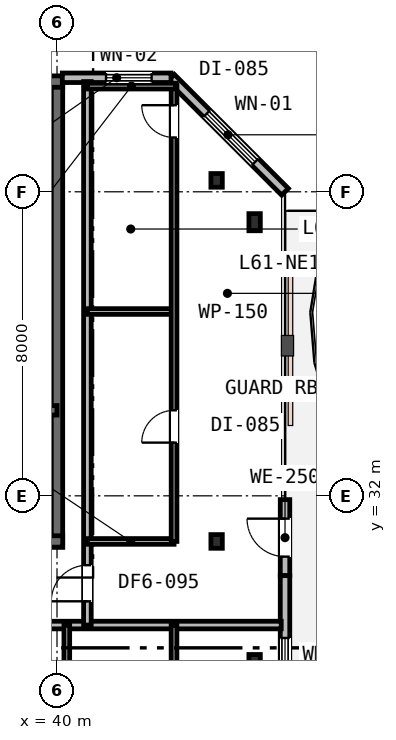
"""IFC4 building model, lengths in metres.
Left out: names, types, materials, properties, quantities, classifications, styles, units other than length and angle.
Written with IfcOpenShell. Run it as: python <this file> out.ifc"""

import sys

from ifc_helpers import new_model, si_unit, direction, frame, frame_2d, origin, origin_2d, place, context, subcontext, project, spatial, rectangle, i_section, extrude, element, fill, save


model = new_model("IFC4")
c1 = context("Model", 3, precision=1e-05, world=origin(), true_north=direction((0.0, 1.0)))
c2 = subcontext(c1, "Body", "Model", "MODEL_VIEW")
j1 = project(units=[si_unit("LENGTHUNIT", "METRE"), si_unit("PLANEANGLEUNIT", "RADIAN")], contexts=[c1])
p1 = place(None, origin())
s1 = spatial("IfcSite", under=j1, at=p1, CompositionType="ELEMENT")
p2 = place(p1, origin())
s2 = spatial("IfcBuilding", under=s1, at=p2, CompositionType="ELEMENT")
p3 = place(p2, frame((0.0, 0.0, 237.4)))
s3 = spatial("IfcBuildingStorey", under=s2, at=p3, CompositionType="ELEMENT", Elevation=237.4)
p4 = place(p3, frame((40.0, 30.65, 0.0), z_axis=(0.0, 0.0, 1.0), x_axis=(0.0, 1.0, 0.0)))
e1 = element("IfcWall", 1, at=p4, inside=s3, PredefinedType="SHEAR", context=c2, shape_type="SweptSolid", body=[
    extrude(rectangle(XDim=12.3, YDim=0.3, at=frame_2d((6.15, 0.0))), origin(), (0.0, 0.0, 1.0), 3.8),
])
p5 = place(p3, frame((15.85, 42.9, 0.0), z_axis=(0.0, 0.0, 1.0), x_axis=(1.0, 0.0, 0.0)))
e2 = element("IfcWall", 2, at=p5, inside=s3, PredefinedType="SHEAR", context=c2, shape_type="SweptSolid", body=[
    extrude(rectangle(XDim=24.3, YDim=0.3, at=frame_2d((12.15, 0.0))), origin(), (0.0, 0.0, 1.0), 3.8),
])
p6 = place(p5, frame((1.6, 0.0, 0.95)))
e3 = element("IfcOpeningElement", 3, at=p6, cuts=e2, PredefinedType="OPENING", context=c2, shape_type="SweptSolid", body=[
    extrude(rectangle(XDim=1.2, YDim=1.6, at=frame_2d((0.6, 0.8))), frame((0.0, 0.16, 0.0), z_axis=(0.0, -1.0, 0.0), x_axis=(1.0, 0.0, 0.0)), (0.0, 0.0, 1.0), 0.32),
])
p7 = place(p5, frame((16.5, 0.0, 0.95)))
e4 = element("IfcOpeningElement", 4, at=p7, cuts=e2, PredefinedType="OPENING", context=c2, shape_type="SweptSolid", body=[
    extrude(rectangle(XDim=1.2, YDim=1.6, at=frame_2d((0.6, 0.8))), frame((0.0, 0.16, 0.0), z_axis=(0.0, -1.0, 0.0), x_axis=(1.0, 0.0, 0.0)), (0.0, 0.0, 1.0), 0.32),
])
p8 = place(p5, frame((21.6, 0.0, 0.95)))
e5 = element("IfcOpeningElement", 5, at=p8, cuts=e2, PredefinedType="OPENING", context=c2, shape_type="SweptSolid", body=[
    extrude(rectangle(XDim=1.2, YDim=1.6, at=frame_2d((0.6, 0.8))), frame((0.0, 0.16, 0.0), z_axis=(0.0, -1.0, 0.0), x_axis=(1.0, 0.0, 0.0)), (0.0, 0.0, 1.0), 0.32),
])
p9 = place(p3, frame((28.95, 30.8, 0.0), z_axis=(0.0, 0.0, 1.0), x_axis=(1.0, 0.0, 0.0)))
e6 = element("IfcWall", 6, at=p9, inside=s3, PredefinedType="SHEAR", context=c2, shape_type="SweptSolid", body=[
    extrude(rectangle(XDim=11.2, YDim=0.3, at=frame_2d((5.6, 0.0))), origin(), (0.0, 0.0, 1.0), 3.8),
])
p10 = place(p9, frame((7.65, 0.0, 0.0)))
e7 = element("IfcOpeningElement", 7, at=p10, cuts=e6, PredefinedType="OPENING", context=c2, shape_type="SweptSolid", body=[
    extrude(rectangle(XDim=1.1, YDim=2.15, at=frame_2d((0.55, 1.075))), frame((0.0, 0.16, 0.0), z_axis=(0.0, -1.0, 0.0), x_axis=(1.0, 0.0, 0.0)), (0.0, 0.0, 1.0), 0.32),
])
p11 = place(p3, frame((33.95, 34.25, 0.0), z_axis=(0.0, 0.0, 1.0), x_axis=(1.0, 0.0, 0.0)))
e8 = element("IfcWall", 8, at=p11, inside=s3, PredefinedType="SHEAR", context=c2, shape_type="SweptSolid", body=[
    extrude(rectangle(XDim=6.05, YDim=0.25, at=frame_2d((3.025, 0.0))), origin(), (0.0, 0.0, 1.0), 3.8),
])
p12 = place(p11, frame((3.7, 0.0, 0.0)))
e9 = element("IfcOpeningElement", 9, at=p12, cuts=e8, PredefinedType="OPENING", context=c2, shape_type="SweptSolid", body=[
    extrude(rectangle(XDim=1.0, YDim=2.15, at=frame_2d((0.5, 1.075))), frame((0.0, 0.135, 0.0), z_axis=(0.0, -1.0, 0.0), x_axis=(1.0, 0.0, 0.0)), (0.0, 0.0, 1.0), 0.27),
])
p13 = place(p11, frame((0.55, 0.0, 0.0)))
e10 = element("IfcOpeningElement", 10, at=p13, cuts=e8, PredefinedType="OPENING", context=c2, shape_type="SweptSolid", body=[
    extrude(rectangle(XDim=1.1, YDim=2.15, at=frame_2d((0.55, 1.075))), frame((0.0, 0.135, 0.0), z_axis=(0.0, -1.0, 0.0), x_axis=(1.0, 0.0, 0.0)), (0.0, 0.0, 1.0), 0.27),
])
for number, where, z_axis, x_axis in (
    (11, (45.2, 27.6, 0.0), (0.0, 0.0, 1.0), (1.0, 0.0, 0.0)),
    (12, (45.2, 39.2, 0.0), (0.0, 0.0, 1.0), (1.0, 0.0, 0.0)),
):
    element("IfcColumn", number, at=place(p3, frame(where, z_axis=z_axis, x_axis=x_axis)), inside=s3, PredefinedType="COLUMN", context=c2, shape_type="SweptSolid", body=[
        extrude(i_section(OverallWidth=0.3, OverallDepth=0.45, WebThickness=0.014, FlangeThickness=0.026, FilletRadius=0.027, at=origin_2d()), origin(), (0.0, 0.0, 1.0), 3.8),
    ])
for number, where, z_axis, x_axis in (
    (13, (44.2, 30.8, 0.0), (0.0, 0.0, 1.0), (1.0, 0.0, 0.0)),
    (14, (44.2, 40.3, 0.0), (0.0, 0.0, 1.0), (1.0, 0.0, 0.0)),
):
    element("IfcColumn", number, at=place(p3, frame(where, z_axis=z_axis, x_axis=x_axis)), inside=s3, PredefinedType="COLUMN", context=c2, shape_type="SweptSolid", body=[
        extrude(i_section(OverallWidth=0.3, OverallDepth=0.36, WebThickness=0.013, FlangeThickness=0.022, FilletRadius=0.027, at=origin_2d()), origin(), (0.0, 0.0, 1.0), 3.8),
    ])
p14 = place(p3, frame((46.0, 29.9, 0.0), z_axis=(0.0, 0.0, 1.0), x_axis=(0.0, 1.0, 0.0)))
e15 = element("IfcWall", 15, at=p14, inside=s3, PredefinedType="STANDARD", context=c2, shape_type="SweptSolid", body=[
    extrude(rectangle(XDim=2.0, YDim=0.25, at=frame_2d((1.0, 0.0))), origin(), (0.0, 0.0, 1.0), 3.53),
])
p15 = place(p14, frame((0.5, 0.0, 0.0)))
e16 = element("IfcOpeningElement", 16, at=p15, cuts=e15, PredefinedType="OPENING", context=c2, shape_type="SweptSolid", body=[
    extrude(rectangle(XDim=1.0, YDim=2.15, at=frame_2d((0.5, 1.075))), frame((0.0, 0.135, 0.0), z_axis=(0.0, -1.0, 0.0), x_axis=(1.0, 0.0, 0.0)), (0.0, 0.0, 1.0), 0.27),
])
p16 = place(p3, frame((46.0, 27.0, 0.0), z_axis=(0.0, 0.0, 1.0), x_axis=(0.0, 1.0, 0.0)))
e17 = element("IfcWall", 17, at=p16, inside=s3, PredefinedType="STANDARD", context=c2, shape_type="SweptSolid", body=[
    extrude(rectangle(XDim=2.9, YDim=0.25, at=frame_2d((1.45, 0.0))), origin(), (0.0, 0.0, 1.0), 3.53),
])
p17 = place(p16, frame((0.36, 0.0, 0.9)))
e18 = element("IfcOpeningElement", 18, at=p17, cuts=e17, PredefinedType="OPENING", context=c2, shape_type="SweptSolid", body=[
    extrude(rectangle(XDim=0.9, YDim=1.55, at=frame_2d((0.45, 0.775))), frame((0.0, 0.135, 0.0), z_axis=(0.0, -1.0, 0.0), x_axis=(1.0, 0.0, 0.0)), (0.0, 0.0, 1.0), 0.27),
])
p18 = place(p3, frame((46.0, 40.0, 0.0), z_axis=(0.0, 0.0, 1.0), x_axis=(-0.707106781187, 0.707106781187, 0.0)))
e19 = element("IfcWall", 19, at=p18, inside=s3, PredefinedType="STANDARD", context=c2, shape_type="SweptSolid", body=[
    extrude(rectangle(XDim=4.243, YDim=0.25, at=frame_2d((2.121, 0.0))), origin(), (0.0, 0.0, 1.0), 3.53),
])
p19 = place(p18, frame((1.111, 0.0, 0.75)))
e20 = element("IfcOpeningElement", 20, at=p19, cuts=e19, PredefinedType="OPENING", context=c2, shape_type="SweptSolid", body=[
    extrude(rectangle(XDim=1.8, YDim=1.85, at=frame_2d((0.9, 0.925))), frame((0.0, 0.135, 0.0), z_axis=(0.0, -1.0, 0.0), x_axis=(1.0, 0.0, 0.0)), (0.0, 0.0, 1.0), 0.27),
])
p20 = place(p3, frame((43.0, 43.0, 0.0), z_axis=(0.0, 0.0, 1.0), x_axis=(-1.0, 0.0, 0.0)))
e21 = element("IfcWall", 21, at=p20, inside=s3, PredefinedType="STANDARD", context=c2, shape_type="SweptSolid", body=[
    extrude(rectangle(XDim=2.86, YDim=0.25, at=frame_2d((1.43, 0.0))), origin(), (0.0, 0.0, 1.0), 3.53),
])
p21 = place(p20, frame((0.51, 0.0, 0.85)))
e22 = element("IfcOpeningElement", 22, at=p21, cuts=e21, PredefinedType="OPENING", context=c2, shape_type="SweptSolid", body=[
    extrude(rectangle(XDim=1.2, YDim=1.6, at=frame_2d((0.6, 0.8))), frame((0.0, 0.135, 0.0), z_axis=(0.0, -1.0, 0.0), x_axis=(1.0, 0.0, 0.0)), (0.0, 0.0, 1.0), 0.27),
])
p22 = place(p3, frame((20.2, 28.6, 0.0), z_axis=(0.0, 0.0, 1.0), x_axis=(1.0, 0.0, 0.0)))
e23 = element("IfcWall", 23, at=p22, inside=s3, PredefinedType="PARTITIONING", context=c2, shape_type="SweptSolid", body=[
    extrude(rectangle(XDim=25.7, YDim=0.2, at=frame_2d((12.85, 0.0))), origin(), (0.0, 0.0, 1.0), 2.92),
])
p23 = place(p22, frame((4.475, 0.0, 0.0)))
e24 = element("IfcOpeningElement", 24, at=p23, cuts=e23, PredefinedType="OPENING", context=c2, shape_type="SweptSolid", body=[
    extrude(rectangle(XDim=0.95, YDim=2.15, at=frame_2d((0.475, 1.075))), frame((0.0, 0.11, 0.0), z_axis=(0.0, -1.0, 0.0), x_axis=(1.0, 0.0, 0.0)), (0.0, 0.0, 1.0), 0.22),
])
p24 = place(p22, frame((10.875, 0.0, 0.0)))
e25 = element("IfcOpeningElement", 25, at=p24, cuts=e23, PredefinedType="OPENING", context=c2, shape_type="SweptSolid", body=[
    extrude(rectangle(XDim=0.95, YDim=2.15, at=frame_2d((0.475, 1.075))), frame((0.0, 0.11, 0.0), z_axis=(0.0, -1.0, 0.0), x_axis=(1.0, 0.0, 0.0)), (0.0, 0.0, 1.0), 0.22),
])
p25 = place(p22, frame((17.854, 0.0, 0.0)))
e26 = element("IfcOpeningElement", 26, at=p25, cuts=e23, PredefinedType="OPENING", context=c2, shape_type="SweptSolid", body=[
    extrude(rectangle(XDim=0.95, YDim=2.15, at=frame_2d((0.475, 1.075))), frame((0.0, 0.11, 0.0), z_axis=(0.0, -1.0, 0.0), x_axis=(1.0, 0.0, 0.0)), (0.0, 0.0, 1.0), 0.22),
])
p26 = place(p3, frame((40.8, 28.6, 0.0), z_axis=(0.0, 0.0, 1.0), x_axis=(0.0, 1.0, 0.0)))
e27 = element("IfcWall", 27, at=p26, inside=s3, PredefinedType="PARTITIONING", context=c2, shape_type="SweptSolid", body=[
    extrude(rectangle(XDim=14.3, YDim=0.2, at=frame_2d((7.15, 0.0))), origin(), (0.0, 0.0, 1.0), 2.92),
])
p27 = place(p26, frame((0.625, 0.0, 0.0)))
e28 = element("IfcOpeningElement", 28, at=p27, cuts=e27, PredefinedType="OPENING", context=c2, shape_type="SweptSolid", body=[
    extrude(rectangle(XDim=0.95, YDim=2.15, at=frame_2d((0.475, 1.075))), frame((0.0, 0.11, 0.0), z_axis=(0.0, -1.0, 0.0), x_axis=(1.0, 0.0, 0.0)), (0.0, 0.0, 1.0), 0.22),
])
p28 = place(p3, frame((40.8, 30.8, 0.0), z_axis=(0.0, 0.0, 1.0), x_axis=(1.0, 0.0, 0.0)))
e29 = element("IfcWall", 29, at=p28, inside=s3, PredefinedType="PARTITIONING", context=c2, shape_type="SweptSolid", body=[
    extrude(rectangle(XDim=2.28, YDim=0.15, at=frame_2d((1.14, 0.0))), origin(), (0.0, 0.0, 1.0), 2.92),
])
p29 = place(p3, frame((40.8, 36.85, 0.0), z_axis=(0.0, 0.0, 1.0), x_axis=(1.0, 0.0, 0.0)))
e30 = element("IfcWall", 30, at=p29, inside=s3, PredefinedType="PARTITIONING", context=c2, shape_type="SweptSolid", body=[
    extrude(rectangle(XDim=2.28, YDim=0.15, at=frame_2d((1.14, 0.0))), origin(), (0.0, 0.0, 1.0), 3.53),
])
p30 = place(p3, frame((43.08, 30.8, 0.0), z_axis=(0.0, 0.0, 1.0), x_axis=(0.0, 1.0, 0.0)))
e31 = element("IfcWall", 31, at=p30, inside=s3, PredefinedType="PARTITIONING", context=c2, shape_type="SweptSolid", body=[
    extrude(rectangle(XDim=12.02, YDim=0.15, at=frame_2d((6.01, 0.0))), origin(), (0.0, 0.0, 1.0), 2.92),
])
p31 = place(p30, frame((2.6, 0.0, 0.0)))
e32 = element("IfcOpeningElement", 32, at=p31, cuts=e31, PredefinedType="OPENING", context=c2, shape_type="SweptSolid", body=[
    extrude(rectangle(XDim=0.85, YDim=2.15, at=frame_2d((0.425, 1.075))), frame((0.0, 0.085, 0.0), z_axis=(0.0, -1.0, 0.0), x_axis=(1.0, 0.0, 0.0)), (0.0, 0.0, 1.0), 0.17),
])
p32 = place(p30, frame((10.629, 0.0, 0.0)))
e33 = element("IfcOpeningElement", 33, at=p32, cuts=e31, PredefinedType="OPENING", context=c2, shape_type="SweptSolid", body=[
    extrude(rectangle(XDim=0.85, YDim=2.15, at=frame_2d((0.425, 1.075))), frame((0.0, 0.085, 0.0), z_axis=(0.0, -1.0, 0.0), x_axis=(1.0, 0.0, 0.0)), (0.0, 0.0, 1.0), 0.17),
])
p33 = place(p3, frame((40.8, 42.78, 0.0), z_axis=(0.0, 0.0, 1.0), x_axis=(1.0, 0.0, 0.0)))
e34 = element("IfcWall", 34, at=p33, inside=s3, PredefinedType="PARTITIONING", context=c2, shape_type="SweptSolid", body=[
    extrude(rectangle(XDim=2.32, YDim=0.15, at=frame_2d((1.16, 0.0))), origin(), (0.0, 0.0, 1.0), 3.53),
])
for number, where, z_axis, x_axis in (
    (35, (40.258, 26.576, 0.0), (0.0, 0.0, 1.0), (0.0, 1.0, 0.0)),
    (36, (43.079, 26.576, 0.0), (0.0, 0.0, 1.0), (0.0, 1.0, 0.0)),
):
    element("IfcWall", number, at=place(p3, frame(where, z_axis=z_axis, x_axis=x_axis)), inside=s3, PredefinedType="PARTITIONING", context=c2, shape_type="SweptSolid", body=[
        extrude(rectangle(XDim=2.024, YDim=0.15, at=frame_2d((1.012, 0.0))), origin(), (0.0, 0.0, 1.0), 3.53),
    ])
p34 = place(p15, origin())
e37 = element("IfcDoor", 37, at=p34, inside=s3, OperationType="SINGLE_SWING_RIGHT", PredefinedType="DOOR", context=c2, shape_type="SweptSolid", body=[
    extrude(rectangle(XDim=1.0, YDim=2.15, at=frame_2d((0.5, 1.075))), frame((0.0, 0.025, 0.0), z_axis=(0.0, -1.0, 0.0), x_axis=(1.0, 0.0, 0.0)), (0.0, 0.0, 1.0), 0.05),
])
fill(e16, e37)
p35 = place(p17, origin())
e38 = element("IfcWindow", 38, at=p35, inside=s3, PartitioningType="SINGLE_PANEL", PredefinedType="WINDOW", context=c2, shape_type="SweptSolid", body=[
    extrude(rectangle(XDim=0.9, YDim=1.55, at=frame_2d((0.45, 0.775))), frame((0.0, 0.03, 0.0), z_axis=(0.0, -1.0, 0.0), x_axis=(1.0, 0.0, 0.0)), (0.0, 0.0, 1.0), 0.06),
])
fill(e18, e38)
p36 = place(p19, origin())
e39 = element("IfcWindow", 39, at=p36, inside=s3, PartitioningType="SINGLE_PANEL", PredefinedType="WINDOW", context=c2, shape_type="SweptSolid", body=[
    extrude(rectangle(XDim=1.8, YDim=1.85, at=frame_2d((0.9, 0.925))), frame((0.0, 0.03, 0.0), z_axis=(0.0, -1.0, 0.0), x_axis=(1.0, 0.0, 0.0)), (0.0, 0.0, 1.0), 0.06),
])
fill(e20, e39)
p37 = place(p21, origin())
e40 = element("IfcWindow", 40, at=p37, inside=s3, PartitioningType="SINGLE_PANEL", PredefinedType="WINDOW", context=c2, shape_type="SweptSolid", body=[
    extrude(rectangle(XDim=1.2, YDim=1.6, at=frame_2d((0.6, 0.8))), frame((0.0, 0.03, 0.0), z_axis=(0.0, -1.0, 0.0), x_axis=(1.0, 0.0, 0.0)), (0.0, 0.0, 1.0), 0.06),
])
fill(e22, e40)
p38 = place(p27, origin())
e41 = element("IfcDoor", 41, at=p38, inside=s3, OperationType="SINGLE_SWING_LEFT", PredefinedType="DOOR", context=c2, shape_type="SweptSolid", body=[
    extrude(rectangle(XDim=0.95, YDim=2.15, at=frame_2d((0.475, 1.075))), frame((0.0, 0.025, 0.0), z_axis=(0.0, -1.0, 0.0), x_axis=(1.0, 0.0, 0.0)), (0.0, 0.0, 1.0), 0.05),
])
fill(e28, e41)
p39 = place(p31, origin())
e42 = element("IfcDoor", 42, at=p39, inside=s3, OperationType="SINGLE_SWING_LEFT", PredefinedType="DOOR", context=c2, shape_type="SweptSolid", body=[
    extrude(rectangle(XDim=0.85, YDim=2.15, at=frame_2d((0.425, 1.075))), frame((0.0, 0.025, 0.0), z_axis=(0.0, -1.0, 0.0), x_axis=(1.0, 0.0, 0.0)), (0.0, 0.0, 1.0), 0.05),
])
fill(e32, e42)
p40 = place(p32, origin())
e43 = element("IfcDoor", 43, at=p40, inside=s3, OperationType="SINGLE_SWING_RIGHT", PredefinedType="DOOR", context=c2, shape_type="SweptSolid", body=[
    extrude(rectangle(XDim=0.85, YDim=2.15, at=frame_2d((0.425, 1.075))), frame((0.0, 0.025, 0.0), z_axis=(0.0, -1.0, 0.0), x_axis=(1.0, 0.0, 0.0)), (0.0, 0.0, 1.0), 0.05),
])
fill(e33, e43)
save(model, sys.argv[1])
